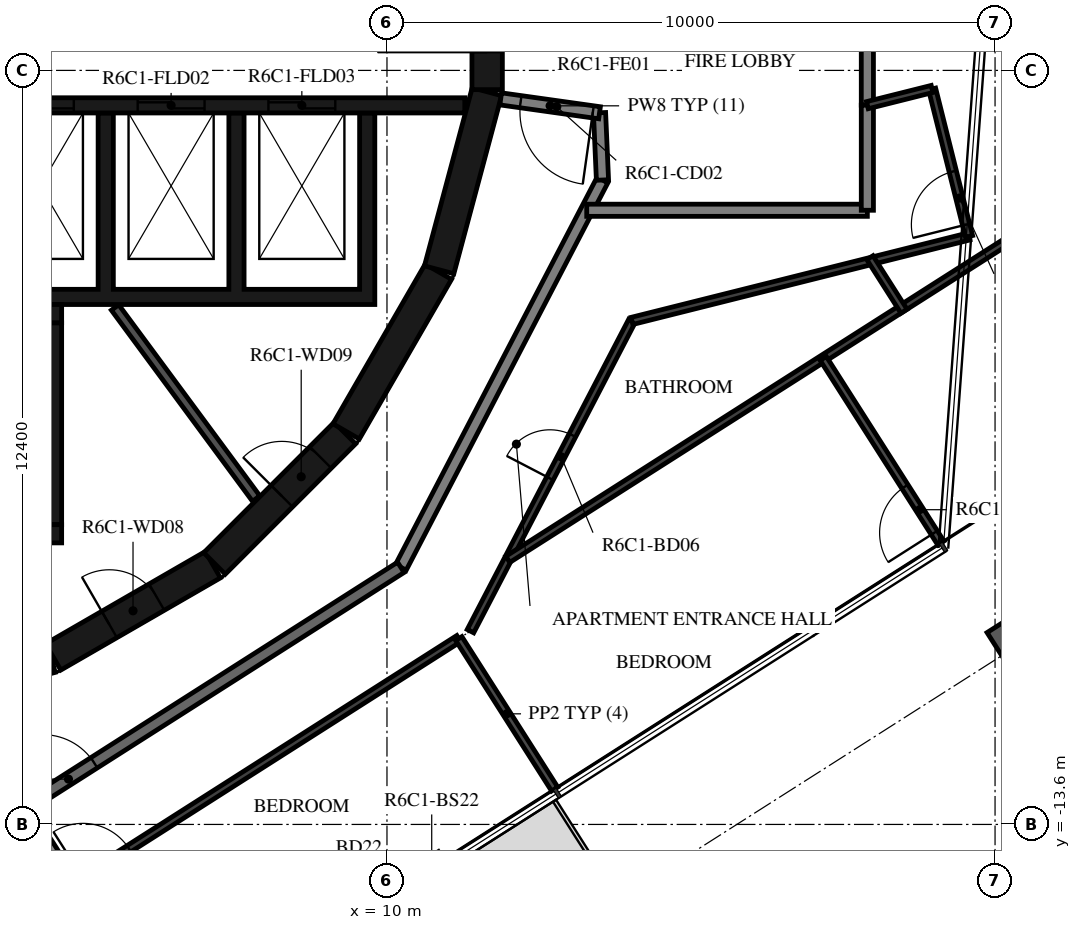
"""IFC4 building model, lengths in metres.
Left out: names, types, materials, properties, quantities, classifications, styles, units other than length and angle.
Written with IfcOpenShell. Run it as: python <this file> out.ifc"""

import sys

from ifc_helpers import new_model, si_unit, direction, frame, frame_2d, origin, origin_2d, place, context, subcontext, project, spatial, polyline, rectangle, i_section, outline, extrude, element, fill, save


model = new_model("IFC4")
c1 = context("Model", 3, precision=1e-05, world=origin(), true_north=direction((0.0, 1.0)))
c2 = subcontext(c1, "Body", "Model", "MODEL_VIEW")
j1 = project(units=[si_unit("LENGTHUNIT", "METRE"), si_unit("PLANEANGLEUNIT", "RADIAN")], contexts=[c1])
p1 = place(None, origin())
s1 = spatial("IfcSite", under=j1, at=p1, CompositionType="ELEMENT")
p2 = place(p1, origin())
s2 = spatial("IfcBuilding", under=s1, at=p2, CompositionType="ELEMENT")
p3 = place(p2, frame((0.0, 0.0, 251.2)))
s3 = spatial("IfcBuildingStorey", under=s2, at=p3, CompositionType="ELEMENT", Elevation=251.2)
p4 = place(p3, frame((20.237, -10.744, -0.38), z_axis=(0.0, 0.0, 1.0), x_axis=(-0.843391139633, -0.537300088953, 0.0)))
e1 = element("IfcColumn", 1, at=p4, inside=s3, PredefinedType="COLUMN", context=c2, shape_type="SweptSolid", body=[
    extrude(i_section(OverallWidth=0.3, OverallDepth=0.9, WebThickness=0.019, FlangeThickness=0.035, FilletRadius=0.03, at=origin_2d()), origin(), (0.0, 0.0, 1.0), 3.5),
])
p5 = place(p3, frame((1.55, -11.643, 0.0), z_axis=(0.0, 0.0, 1.0), x_axis=(0.965948410781, 0.258734743916, 0.0)))
e2 = element("IfcWall", 2, at=p5, inside=s3, PredefinedType="SHEAR", context=c2, shape_type="SweptSolid", body=[
    extrude(rectangle(XDim=3.033, YDim=0.5, at=frame_2d((1.516, 0.0))), origin(), (0.0, 0.0, 1.0), 3.12),
])
p6 = place(p3, frame((4.51, -10.845, 0.0), z_axis=(0.0, 0.0, 1.0), x_axis=(0.865975092491, 0.500087131594, 0.0)))
e3 = element("IfcWall", 3, at=p6, inside=s3, PredefinedType="SHEAR", context=c2, shape_type="SweptSolid", body=[
    extrude(rectangle(XDim=3.033, YDim=0.5, at=frame_2d((1.516, 0.0))), origin(), (0.0, 0.0, 1.0), 3.12),
])
p7 = place(p6, frame((1.066, 0.0, 0.0)))
e4 = element("IfcOpeningElement", 4, at=p7, cuts=e3, PredefinedType="OPENING", context=c2, shape_type="SweptSolid", body=[
    extrude(rectangle(XDim=0.9, YDim=2.1, at=frame_2d((0.45, 1.05))), frame((0.0, 0.26, 0.0), z_axis=(0.0, -1.0, 0.0), x_axis=(1.0, 0.0, 0.0)), (0.0, 0.0, 1.0), 0.52),
])
p8 = place(p3, frame((7.164, -9.308, 0.0), z_axis=(0.0, 0.0, 1.0), x_axis=(0.707106781187, 0.707106781187, 0.0)))
e5 = element("IfcWall", 5, at=p8, inside=s3, PredefinedType="SHEAR", context=c2, shape_type="SweptSolid", body=[
    extrude(rectangle(XDim=3.032, YDim=0.5, at=frame_2d((1.516, 0.0))), origin(), (0.0, 0.0, 1.0), 3.12),
])
p9 = place(p8, frame((1.566, 0.0, 0.0)))
e6 = element("IfcOpeningElement", 6, at=p9, cuts=e5, PredefinedType="OPENING", context=c2, shape_type="SweptSolid", body=[
    extrude(rectangle(XDim=0.9, YDim=2.1, at=frame_2d((0.45, 1.05))), frame((0.0, 0.26, 0.0), z_axis=(0.0, -1.0, 0.0), x_axis=(1.0, 0.0, 0.0)), (0.0, 0.0, 1.0), 0.52),
])
for number, where, z_axis, x_axis in (
    (7, (9.329, -7.137, 0.0), (0.0, 0.0, 1.0), (0.5, 0.866, 0.0)),
    (8, (10.858, -4.479, 0.0), (0.0, 0.0, 1.0), (0.259, 0.966, 0.0)),
):
    element("IfcWall", number, at=place(p3, frame(where, z_axis=z_axis, x_axis=x_axis)), inside=s3, PredefinedType="SHEAR", context=c2, shape_type="SweptSolid", body=[
        extrude(rectangle(XDim=3.033, YDim=0.5, at=frame_2d((1.516, 0.0))), origin(), (0.0, 0.0, 1.0), 3.12),
    ])
p10 = place(p3, frame((11.647, -1.516, 0.0), z_axis=(0.0, 0.0, 1.0), x_axis=(0.0, 1.0, 0.0)))
e9 = element("IfcWall", 9, at=p10, inside=s3, PredefinedType="SHEAR", context=c2, shape_type="SweptSolid", body=[
    extrude(rectangle(XDim=3.033, YDim=0.5, at=frame_2d((1.516, 0.0))), origin(), (0.0, 0.0, 1.0), 3.12),
])
p11 = place(p10, frame((0.616, 0.0, 0.0)))
e10 = element("IfcOpeningElement", 10, at=p11, cuts=e9, PredefinedType="OPENING", context=c2, shape_type="SweptSolid", body=[
    extrude(rectangle(XDim=1.8, YDim=2.1, at=frame_2d((0.9, 1.05))), frame((0.0, 0.26, 0.0), z_axis=(0.0, -1.0, 0.0), x_axis=(1.0, 0.0, 0.0)), (0.0, 0.0, 1.0), 0.52),
])
p12 = place(p3, frame((-2.4, -5.2, 0.0), z_axis=(0.0, 0.0, 1.0), x_axis=(1.0, 0.0, 0.0)))
e11 = element("IfcWall", 11, at=p12, inside=s3, PredefinedType="SHEAR", context=c2, shape_type="SweptSolid", body=[
    extrude(rectangle(XDim=7.05, YDim=0.3, at=frame_2d((3.525, 0.0))), origin(), (0.0, 0.0, 1.0), 3.12),
])
p13 = place(p3, frame((4.5, -8.67, 0.0), z_axis=(0.0, 0.0, 1.0), x_axis=(0.0, 1.0, 0.0)))
e12 = element("IfcWall", 12, at=p13, inside=s3, PredefinedType="SHEAR", context=c2, shape_type="SweptSolid", body=[
    extrude(rectangle(XDim=3.32, YDim=0.3, at=frame_2d((1.66, 0.0))), origin(), (0.0, 0.0, 1.0), 3.12),
])
p14 = place(p3, frame((0.1, -8.82, 0.0), z_axis=(0.0, 0.0, 1.0), x_axis=(1.0, 0.0, 0.0)))
e13 = element("IfcWall", 13, at=p14, inside=s3, PredefinedType="SHEAR", context=c2, shape_type="SweptSolid", body=[
    extrude(rectangle(XDim=4.55, YDim=0.3, at=frame_2d((2.275, 0.0))), origin(), (0.0, 0.0, 1.0), 3.12),
])
p15 = place(p3, origin())
e14 = element("IfcWall", 14, at=p15, inside=s3, PredefinedType="SHEAR", context=c2, shape_type="SweptSolid", body=[
    extrude(outline(polyline([(9.8, -5.05), (9.8, -4.8), (9.8, -1.9), (9.55, -1.9), (9.55, -4.8), (7.65, -4.8), (7.65, -1.9), (7.4, -1.9), (7.4, -4.8), (5.5, -4.8), (5.5, -1.9), (5.25, -1.9), (5.25, -4.8), (3.35, -4.8), (3.35, -1.9), (3.1, -1.9), (3.1, -4.8), (1.2, -4.8), (1.2, -1.9), (0.95, -1.9), (0.95, -4.8), (-0.95, -4.8), (-0.95, -1.9), (-1.2, -1.9), (-1.2, -4.8), (-3.1, -4.8), (-3.1, -1.9), (-3.35, -1.9), (-3.35, -4.8), (-5.25, -4.8), (-5.25, -1.9), (-5.5, -1.9), (-5.5, -4.8), (-7.4, -4.8), (-7.4, -1.9), (-7.65, -1.9), (-7.65, -4.8), (-9.55, -4.8), (-9.55, -1.9), (-9.8, -1.9), (-9.8, -4.8), (-9.8, -5.05), (9.8, -5.05)])), origin(), (0.0, 0.0, 1.0), 3.12),
])
p16 = place(p3, frame((3.35, -1.775, 0.0), z_axis=(0.0, 0.0, 1.0), x_axis=(1.0, 0.0, 0.0)))
e15 = element("IfcWall", 15, at=p16, inside=s3, PredefinedType="SHEAR", context=c2, shape_type="SweptSolid", body=[
    extrude(rectangle(XDim=7.93, YDim=0.25, at=frame_2d((3.965, 0.0))), origin(), (0.0, 0.0, 1.0), 3.12),
])
p17 = place(p16, frame((0.4, 0.0, 0.0)))
e16 = element("IfcOpeningElement", 16, at=p17, cuts=e15, PredefinedType="OPENING", context=c2, shape_type="SweptSolid", body=[
    extrude(rectangle(XDim=1.1, YDim=2.4, at=frame_2d((0.55, 1.2))), frame((0.0, 0.135, 0.0), z_axis=(0.0, -1.0, 0.0), x_axis=(1.0, 0.0, 0.0)), (0.0, 0.0, 1.0), 0.27),
])
p18 = place(p16, frame((2.55, 0.0, 0.0)))
e17 = element("IfcOpeningElement", 17, at=p18, cuts=e15, PredefinedType="OPENING", context=c2, shape_type="SweptSolid", body=[
    extrude(rectangle(XDim=1.1, YDim=2.4, at=frame_2d((0.55, 1.2))), frame((0.0, 0.135, 0.0), z_axis=(0.0, -1.0, 0.0), x_axis=(1.0, 0.0, 0.0)), (0.0, 0.0, 1.0), 0.27),
])
p19 = place(p16, frame((4.7, 0.0, 0.0)))
e18 = element("IfcOpeningElement", 18, at=p19, cuts=e15, PredefinedType="OPENING", context=c2, shape_type="SweptSolid", body=[
    extrude(rectangle(XDim=1.1, YDim=2.4, at=frame_2d((0.55, 1.2))), frame((0.0, 0.135, 0.0), z_axis=(0.0, -1.0, 0.0), x_axis=(1.0, 0.0, 0.0)), (0.0, 0.0, 1.0), 0.27),
])
p20 = place(p3, frame((5.528, -5.098, 0.0), z_axis=(0.0, 0.0, 1.0), x_axis=(0.594034318069, -0.804439698769, 0.0)))
e19 = element("IfcWall", 19, at=p20, inside=s3, PredefinedType="PARTITIONING", context=c2, shape_type="SweptSolid", body=[
    extrude(rectangle(XDim=3.907, YDim=0.15, at=frame_2d((1.953, 0.0))), origin(), (0.0, 0.0, 1.0), 3.12),
])
p21 = place(p3, frame((10.228, -9.372, 0.0), z_axis=(0.0, 0.0, 1.0), x_axis=(0.461759464021, 0.887005184532, 0.0)))
e20 = element("IfcWall", 20, at=p21, inside=s3, PredefinedType="STANDARD", context=c2, shape_type="SweptSolid", body=[
    extrude(rectangle(XDim=7.181, YDim=0.2, at=frame_2d((3.591, 0.0))), origin(), (0.0, 0.0, 1.0), 3.12),
])
p22 = place(p3, frame((13.544, -3.003, 0.0), z_axis=(0.0, 0.0, 1.0), x_axis=(-0.043666917606, 0.999046145234, 0.0)))
e21 = element("IfcWall", 21, at=p22, inside=s3, PredefinedType="STANDARD", context=c2, shape_type="SweptSolid", body=[
    extrude(rectangle(XDim=1.107, YDim=0.2, at=frame_2d((0.553, 0.0))), origin(), (0.0, 0.0, 1.0), 3.12),
])
p23 = place(p3, frame((13.496, -1.897, 0.0), z_axis=(0.0, 0.0, 1.0), x_axis=(-0.99026234641, 0.139213811391, 0.0)))
e22 = element("IfcWall", 22, at=p23, inside=s3, PredefinedType="STANDARD", context=c2, shape_type="SweptSolid", body=[
    extrude(rectangle(XDim=1.641, YDim=0.2, at=frame_2d((0.821, 0.0))), origin(), (0.0, 0.0, 1.0), 3.12),
])
p24 = place(p23, frame((0.11, 0.0, 0.0)))
e23 = element("IfcOpeningElement", 23, at=p24, cuts=e22, PredefinedType="OPENING", context=c2, shape_type="SweptSolid", body=[
    extrude(rectangle(XDim=1.2, YDim=2.1, at=frame_2d((0.6, 1.05))), frame((0.0, 0.11, 0.0), z_axis=(0.0, -1.0, 0.0), x_axis=(1.0, 0.0, 0.0)), (0.0, 0.0, 1.0), 0.22),
])
p25 = place(p3, frame((4.172, -13.231, 0.0), z_axis=(0.0, 0.0, 1.0), x_axis=(0.843388394728, 0.537304397561, 0.0)))
e24 = element("IfcWall", 24, at=p25, inside=s3, PredefinedType="STANDARD", context=c2, shape_type="SweptSolid", body=[
    extrude(rectangle(XDim=7.181, YDim=0.2, at=frame_2d((3.59, 0.0))), origin(), (0.0, 0.0, 1.0), 3.12),
])
p26 = place(p25, frame((0.2, 0.0, 0.0)))
e25 = element("IfcOpeningElement", 25, at=p26, cuts=e24, PredefinedType="OPENING", context=c2, shape_type="SweptSolid", body=[
    extrude(rectangle(XDim=1.0, YDim=2.1, at=frame_2d((0.5, 1.05))), frame((0.0, 0.11, 0.0), z_axis=(0.0, -1.0, 0.0), x_axis=(1.0, 0.0, 0.0)), (0.0, 0.0, 1.0), 0.22),
])
p27 = place(p3, frame((17.9, -1.772, 0.0), z_axis=(0.0, 0.0, 1.0), x_axis=(0.0, 1.0, 0.0)))
e26 = element("IfcWall", 26, at=p27, inside=s3, PredefinedType="STANDARD", context=c2, shape_type="SweptSolid", body=[
    extrude(rectangle(XDim=5.272, YDim=0.2, at=frame_2d((2.636, 0.0))), origin(), (0.0, 0.0, 1.0), 3.12),
])
p28 = place(p3, frame((13.285, -3.5, 0.0), z_axis=(0.0, 0.0, 1.0), x_axis=(1.0, 0.0, 0.0)))
e27 = element("IfcWall", 27, at=p28, inside=s3, PredefinedType="STANDARD", context=c2, shape_type="SweptSolid", body=[
    extrude(rectangle(XDim=4.615, YDim=0.2, at=frame_2d((2.308, 0.0))), origin(), (0.0, 0.0, 1.0), 3.12),
])
p29 = place(p3, frame((17.9, -3.5, 0.0), z_axis=(0.0, 0.0, 1.0), x_axis=(0.0, 1.0, 0.0)))
e28 = element("IfcWall", 28, at=p29, inside=s3, PredefinedType="STANDARD", context=c2, shape_type="SweptSolid", body=[
    extrude(rectangle(XDim=1.728, YDim=0.2, at=frame_2d((0.864, 0.0))), origin(), (0.0, 0.0, 1.0), 3.12),
])
p30 = place(p3, frame((6.407, -17.064, 0.0), z_axis=(0.0, 0.0, 1.0), x_axis=(-0.537324777979, 0.843375410461, 0.0)))
e29 = element("IfcWall", 29, at=p30, inside=s3, PredefinedType="STANDARD", context=c2, shape_type="SweptSolid", body=[
    extrude(rectangle(XDim=4.535, YDim=0.2, at=frame_2d((2.268, 0.0))), origin(), (0.0, 0.0, 1.0), 2.73),
])
p31 = place(p3, frame((4.83, -14.59, 0.0), z_axis=(0.0, 0.0, 1.0), x_axis=(0.843393042763, 0.537297101629, 0.0)))
e30 = element("IfcWall", 30, at=p31, inside=s3, PredefinedType="PARTITIONING", context=c2, shape_type="SweptSolid", body=[
    extrude(rectangle(XDim=7.53, YDim=0.12, at=frame_2d((3.765, 0.0))), origin(), (0.0, 0.0, 1.0), 3.12),
])
p32 = place(p31, frame((0.2, 0.0, 0.0)))
e31 = element("IfcOpeningElement", 31, at=p32, cuts=e30, PredefinedType="OPENING", context=c2, shape_type="SweptSolid", body=[
    extrude(rectangle(XDim=0.9, YDim=2.1, at=frame_2d((0.45, 1.05))), frame((0.0, 0.07, 0.0), z_axis=(0.0, -1.0, 0.0), x_axis=(1.0, 0.0, 0.0)), (0.0, 0.0, 1.0), 0.14),
])
p33 = place(p3, frame((11.373, -10.421, 0.0), z_axis=(0.0, 0.0, 1.0), x_axis=(0.461738939635, 0.887015868869, 0.0)))
e32 = element("IfcWall", 32, at=p33, inside=s3, PredefinedType="PARTITIONING", context=c2, shape_type="SweptSolid", body=[
    extrude(rectangle(XDim=5.752, YDim=0.12, at=frame_2d((2.876, 0.0))), origin(), (0.0, 0.0, 1.0), 3.12),
])
p34 = place(p33, frame((2.831, 0.0, 0.0)))
e33 = element("IfcOpeningElement", 33, at=p34, cuts=e32, PredefinedType="OPENING", context=c2, shape_type="SweptSolid", body=[
    extrude(rectangle(XDim=0.8, YDim=2.1, at=frame_2d((0.4, 1.05))), frame((0.0, 0.07, 0.0), z_axis=(0.0, -1.0, 0.0), x_axis=(1.0, 0.0, 0.0)), (0.0, 0.0, 1.0), 0.14),
])
p35 = place(p3, frame((14.029, -5.32, 0.0), z_axis=(0.0, 0.0, 1.0), x_axis=(0.969999099814, 0.243108507378, 0.0)))
e34 = element("IfcWall", 34, at=p35, inside=s3, PredefinedType="PARTITIONING", context=c2, shape_type="SweptSolid", body=[
    extrude(rectangle(XDim=5.715, YDim=0.12, at=frame_2d((2.857, 0.0))), origin(), (0.0, 0.0, 1.0), 3.12),
])
p36 = place(p3, frame((19.573, -3.93, 0.0), z_axis=(0.0, 0.0, 1.0), x_axis=(-0.243155959183, 0.96998720585, 0.0)))
e35 = element("IfcWall", 35, at=p36, inside=s3, PredefinedType="PARTITIONING", context=c2, shape_type="SweptSolid", body=[
    extrude(rectangle(XDim=2.5, YDim=0.12, at=frame_2d((1.25, 0.0))), origin(), (0.0, 0.0, 1.0), 3.12),
])
p37 = place(p36, frame((0.2, 0.0, 0.0)))
e36 = element("IfcOpeningElement", 36, at=p37, cuts=e35, PredefinedType="OPENING", context=c2, shape_type="SweptSolid", body=[
    extrude(rectangle(XDim=0.9, YDim=2.1, at=frame_2d((0.45, 1.05))), frame((0.0, 0.07, 0.0), z_axis=(0.0, -1.0, 0.0), x_axis=(1.0, 0.0, 0.0)), (0.0, 0.0, 1.0), 0.14),
])
p38 = place(p3, frame((18.965, -1.505, 0.0), z_axis=(0.0, 0.0, 1.0), x_axis=(-0.969998406835, -0.243111272339, 0.0)))
e37 = element("IfcWall", 37, at=p38, inside=s3, PredefinedType="PARTITIONING", context=c2, shape_type="SweptSolid", body=[
    extrude(rectangle(XDim=1.098, YDim=0.12, at=frame_2d((0.549, 0.0))), origin(), (0.0, 0.0, 1.0), 3.12),
])
p39 = place(p3, frame((12.758, -13.018, 0.0), z_axis=(0.0, 0.0, 1.0), x_axis=(-0.537338423153, 0.843366716798, 0.0)))
e38 = element("IfcWall", 38, at=p39, inside=s3, PredefinedType="PARTITIONING", context=c2, shape_type="SweptSolid", body=[
    extrude(rectangle(XDim=2.934, YDim=0.12, at=frame_2d((1.467, 0.0))), origin(), (0.0, 0.0, 1.0), 2.73),
])
p40 = place(p3, frame((21.837, -2.966, 0.0), z_axis=(0.0, 0.0, 1.0), x_axis=(-0.843394529709, -0.537294767569, 0.0)))
e39 = element("IfcWall", 39, at=p40, inside=s3, PredefinedType="PARTITIONING", context=c2, shape_type="SweptSolid", body=[
    extrude(rectangle(XDim=11.678, YDim=0.12, at=frame_2d((5.839, 0.0))), origin(), (0.0, 0.0, 1.0), 3.12),
])
p41 = place(p40, frame((0.2, 0.0, 0.0)))
e40 = element("IfcOpeningElement", 40, at=p41, cuts=e39, PredefinedType="OPENING", context=c2, shape_type="SweptSolid", body=[
    extrude(rectangle(XDim=0.9, YDim=2.1, at=frame_2d((0.45, 1.05))), frame((0.0, 0.07, 0.0), z_axis=(0.0, -1.0, 0.0), x_axis=(1.0, 0.0, 0.0)), (0.0, 0.0, 1.0), 0.14),
])
p42 = place(p3, frame((19.109, -8.972, 0.0), z_axis=(0.0, 0.0, 1.0), x_axis=(-0.537318625891, 0.843379329999, 0.0)))
e41 = element("IfcWall", 41, at=p42, inside=s3, PredefinedType="PARTITIONING", context=c2, shape_type="SweptSolid", body=[
    extrude(rectangle(XDim=3.6, YDim=0.12, at=frame_2d((1.8, 0.0))), origin(), (0.0, 0.0, 1.0), 2.73),
])
p43 = place(p42, frame((0.2, 0.0, 0.0)))
e42 = element("IfcOpeningElement", 42, at=p43, cuts=e41, PredefinedType="OPENING", context=c2, shape_type="SweptSolid", body=[
    extrude(rectangle(XDim=0.9, YDim=2.1, at=frame_2d((0.45, 1.05))), frame((0.0, 0.07, 0.0), z_axis=(0.0, -1.0, 0.0), x_axis=(1.0, 0.0, 0.0)), (0.0, 0.0, 1.0), 0.14),
])
p44 = place(p3, frame((18.503, -5.161, 0.0), z_axis=(0.0, 0.0, 1.0), x_axis=(-0.537208231854, 0.843449652101, 0.0)))
e43 = element("IfcWall", 43, at=p44, inside=s3, PredefinedType="PARTITIONING", context=c2, shape_type="SweptSolid", body=[
    extrude(rectangle(XDim=1.044, YDim=0.12, at=frame_2d((0.522, 0.0))), origin(), (0.0, 0.0, 1.0), 3.12),
])
p45 = place(p11, origin())
e44 = element("IfcDoor", 44, at=p45, inside=s3, OperationType="DOUBLE_DOOR_SINGLE_SWING", PredefinedType="DOOR", context=c2, shape_type="SweptSolid", body=[
    extrude(rectangle(XDim=1.8, YDim=2.1, at=frame_2d((0.9, 1.05))), frame((0.0, 0.025, 0.0), z_axis=(0.0, -1.0, 0.0), x_axis=(1.0, 0.0, 0.0)), (0.0, 0.0, 1.0), 0.05),
])
fill(e10, e44)
p46 = place(p17, origin())
e45 = element("IfcDoor", 45, at=p46, inside=s3, OperationType="DOUBLE_DOOR_SLIDING", PredefinedType="DOOR", context=c2, shape_type="SweptSolid", body=[
    extrude(rectangle(XDim=1.1, YDim=2.4, at=frame_2d((0.55, 1.2))), frame((0.0, 0.025, 0.0), z_axis=(0.0, -1.0, 0.0), x_axis=(1.0, 0.0, 0.0)), (0.0, 0.0, 1.0), 0.05),
])
fill(e16, e45)
p47 = place(p18, origin())
e46 = element("IfcDoor", 46, at=p47, inside=s3, OperationType="DOUBLE_DOOR_SLIDING", PredefinedType="DOOR", context=c2, shape_type="SweptSolid", body=[
    extrude(rectangle(XDim=1.1, YDim=2.4, at=frame_2d((0.55, 1.2))), frame((0.0, 0.025, 0.0), z_axis=(0.0, -1.0, 0.0), x_axis=(1.0, 0.0, 0.0)), (0.0, 0.0, 1.0), 0.05),
])
fill(e17, e46)
p48 = place(p19, origin())
e47 = element("IfcDoor", 47, at=p48, inside=s3, OperationType="DOUBLE_DOOR_SLIDING", PredefinedType="DOOR", context=c2, shape_type="SweptSolid", body=[
    extrude(rectangle(XDim=1.1, YDim=2.4, at=frame_2d((0.55, 1.2))), frame((0.0, 0.025, 0.0), z_axis=(0.0, -1.0, 0.0), x_axis=(1.0, 0.0, 0.0)), (0.0, 0.0, 1.0), 0.05),
])
fill(e18, e47)
p49 = place(p7, origin())
e48 = element("IfcDoor", 48, at=p49, inside=s3, OperationType="SINGLE_SWING_RIGHT", PredefinedType="DOOR", context=c2, shape_type="SweptSolid", body=[
    extrude(rectangle(XDim=0.9, YDim=2.1, at=frame_2d((0.45, 1.05))), frame((0.0, 0.025, 0.0), z_axis=(0.0, -1.0, 0.0), x_axis=(1.0, 0.0, 0.0)), (0.0, 0.0, 1.0), 0.05),
])
fill(e4, e48)
p50 = place(p9, origin())
e49 = element("IfcDoor", 49, at=p50, inside=s3, OperationType="SINGLE_SWING_LEFT", PredefinedType="DOOR", context=c2, shape_type="SweptSolid", body=[
    extrude(rectangle(XDim=0.9, YDim=2.1, at=frame_2d((0.45, 1.05))), frame((0.0, 0.025, 0.0), z_axis=(0.0, -1.0, 0.0), x_axis=(1.0, 0.0, 0.0)), (0.0, 0.0, 1.0), 0.05),
])
fill(e6, e49)
p51 = place(p26, origin())
e50 = element("IfcDoor", 50, at=p51, inside=s3, OperationType="SINGLE_SWING_LEFT", PredefinedType="DOOR", context=c2, shape_type="SweptSolid", body=[
    extrude(rectangle(XDim=1.0, YDim=2.1, at=frame_2d((0.5, 1.05))), frame((0.0, 0.025, 0.0), z_axis=(0.0, -1.0, 0.0), x_axis=(1.0, 0.0, 0.0)), (0.0, 0.0, 1.0), 0.05),
])
fill(e25, e50)
p52 = place(p32, origin())
e51 = element("IfcDoor", 51, at=p52, inside=s3, OperationType="SINGLE_SWING_LEFT", PredefinedType="DOOR", context=c2, shape_type="SweptSolid", body=[
    extrude(rectangle(XDim=0.9, YDim=2.1, at=frame_2d((0.45, 1.05))), frame((0.0, 0.025, 0.0), z_axis=(0.0, -1.0, 0.0), x_axis=(1.0, 0.0, 0.0)), (0.0, 0.0, 1.0), 0.05),
])
fill(e31, e51)
p53 = place(p34, origin())
e52 = element("IfcDoor", 52, at=p53, inside=s3, OperationType="SINGLE_SWING_RIGHT", PredefinedType="DOOR", context=c2, shape_type="SweptSolid", body=[
    extrude(rectangle(XDim=0.8, YDim=2.1, at=frame_2d((0.4, 1.05))), frame((0.0, 0.025, 0.0), z_axis=(0.0, -1.0, 0.0), x_axis=(1.0, 0.0, 0.0)), (0.0, 0.0, 1.0), 0.05),
])
fill(e33, e52)
p54 = place(p37, origin())
e53 = element("IfcDoor", 53, at=p54, inside=s3, OperationType="SINGLE_SWING_RIGHT", PredefinedType="DOOR", context=c2, shape_type="SweptSolid", body=[
    extrude(rectangle(XDim=0.9, YDim=2.1, at=frame_2d((0.45, 1.05))), frame((0.0, 0.025, 0.0), z_axis=(0.0, -1.0, 0.0), x_axis=(1.0, 0.0, 0.0)), (0.0, 0.0, 1.0), 0.05),
])
fill(e36, e53)
p55 = place(p43, origin())
e54 = element("IfcDoor", 54, at=p55, inside=s3, OperationType="SINGLE_SWING_LEFT", PredefinedType="DOOR", context=c2, shape_type="SweptSolid", body=[
    extrude(rectangle(XDim=0.9, YDim=2.1, at=frame_2d((0.45, 1.05))), frame((0.0, 0.025, 0.0), z_axis=(0.0, -1.0, 0.0), x_axis=(1.0, 0.0, 0.0)), (0.0, 0.0, 1.0), 0.05),
])
fill(e42, e54)
p56 = place(p24, origin())
e55 = element("IfcDoor", 55, at=p56, inside=s3, OperationType="DOUBLE_DOOR_SINGLE_SWING", PredefinedType="DOOR", context=c2, shape_type="SweptSolid", body=[
    extrude(rectangle(XDim=1.2, YDim=2.1, at=frame_2d((0.6, 1.05))), frame((0.0, 0.025, 0.0), z_axis=(0.0, -1.0, 0.0), x_axis=(1.0, 0.0, 0.0)), (0.0, 0.0, 1.0), 0.05),
])
fill(e23, e55)
save(model, sys.argv[1])
